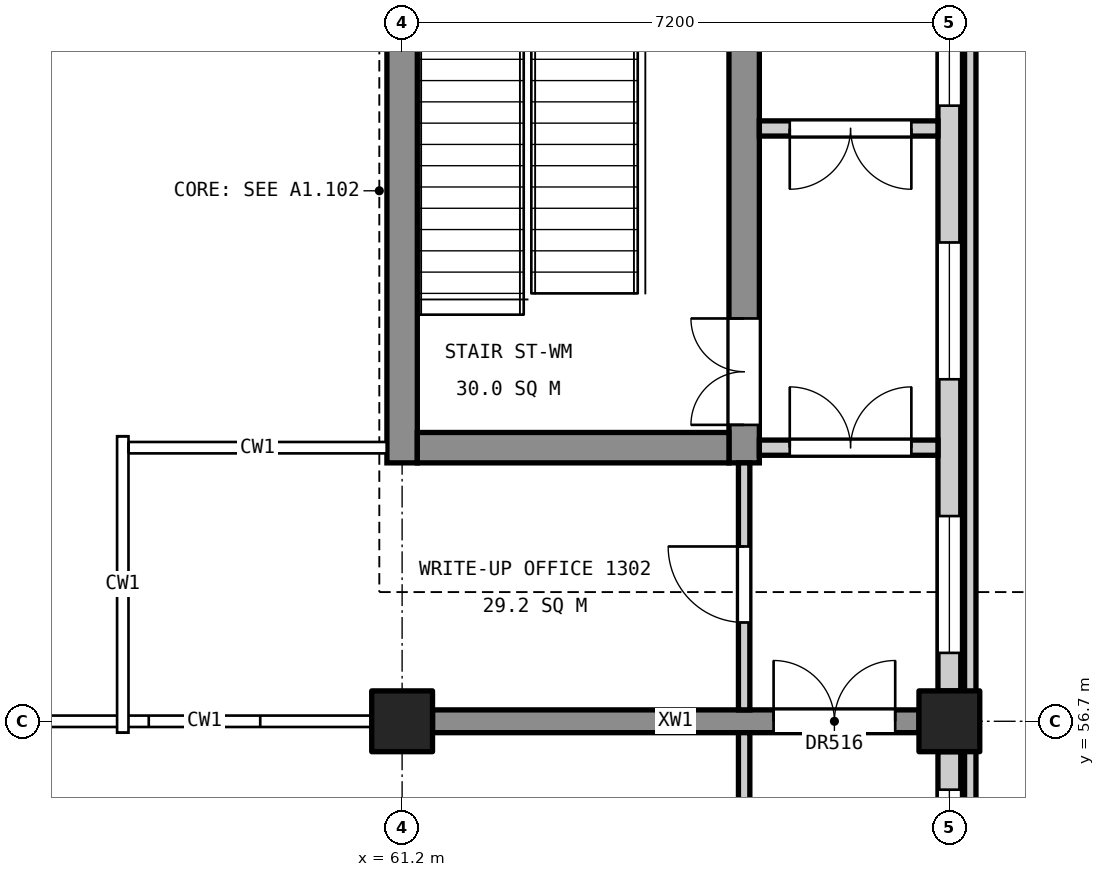
"""IFC4 building model, lengths in metres.
Left out: names, types, materials, properties, quantities, classifications, styles, units other than length and angle.
Written with IfcOpenShell. Run it as: python <this file> out.ifc"""

import sys

from ifc_helpers import new_model, si_unit, direction, frame, frame_2d, origin, origin_2d, place, context, subcontext, project, spatial, rectangle, extrude, element, fill, save


model = new_model("IFC4")
c1 = context("Model", 3, precision=1e-05, world=origin(), true_north=direction((0.0, 1.0)))
c2 = subcontext(c1, "Body", "Model", "MODEL_VIEW")
j1 = project(units=[si_unit("LENGTHUNIT", "METRE"), si_unit("PLANEANGLEUNIT", "RADIAN")], contexts=[c1])
p1 = place(None, origin())
s1 = spatial("IfcSite", under=j1, at=p1, CompositionType="ELEMENT")
p2 = place(p1, origin())
s2 = spatial("IfcBuilding", under=s1, at=p2, CompositionType="ELEMENT")
p3 = place(p2, frame((0.0, 0.0, 65.4)))
s3 = spatial("IfcBuildingStorey", under=s2, at=p3, CompositionType="ELEMENT", Elevation=65.4)
for number, where, z_axis, x_axis in (
    (1, (61.2, 56.7, 0.0), (0.0, 0.0, 1.0), (1.0, 0.0, 0.0)),
    (2, (68.4, 56.7, 0.0), (0.0, 0.0, 1.0), (1.0, 0.0, 0.0)),
):
    element("IfcColumn", number, at=place(p3, frame(where, z_axis=z_axis, x_axis=x_axis)), inside=s3, PredefinedType="COLUMN", context=c2, shape_type="SweptSolid", body=[
        extrude(rectangle(XDim=0.8, YDim=0.8, at=origin_2d()), origin(), (0.0, 0.0, 1.0), 4.8),
    ])
p4 = place(p3, frame((61.2, 60.1, 0.0), z_axis=(0.0, 0.0, 1.0), x_axis=(0.0, 1.0, 0.0)))
e3 = element("IfcWall", 3, at=p4, inside=s3, PredefinedType="SHEAR", context=c2, shape_type="SweptSolid", body=[
    extrude(rectangle(XDim=14.8, YDim=0.4, at=frame_2d((7.4, 0.0))), origin(), (0.0, 0.0, 1.0), 4.55),
])
p5 = place(p4, frame((6.11, 0.0, 3.4)))
e4 = element("IfcOpeningElement", 4, at=p5, cuts=e3, PredefinedType="OPENING", context=c2, shape_type="SweptSolid", body=[
    extrude(rectangle(XDim=1.2, YDim=0.9, at=frame_2d((0.6, 0.45))), frame((0.0, 0.21, 0.0), z_axis=(0.0, -1.0, 0.0), x_axis=(1.0, 0.0, 0.0)), (0.0, 0.0, 1.0), 0.42),
])
p6 = place(p3, frame((65.7, 60.1, 0.0), z_axis=(0.0, 0.0, 1.0), x_axis=(0.0, 1.0, 0.0)))
e5 = element("IfcWall", 5, at=p6, inside=s3, PredefinedType="SHEAR", context=c2, shape_type="SweptSolid", body=[
    extrude(rectangle(XDim=14.8, YDim=0.4, at=frame_2d((7.4, 0.0))), origin(), (0.0, 0.0, 1.0), 4.55),
])
p7 = place(p6, frame((0.5, 0.0, 0.0)))
e6 = element("IfcOpeningElement", 6, at=p7, cuts=e5, PredefinedType="OPENING", context=c2, shape_type="SweptSolid", body=[
    extrude(rectangle(XDim=1.4, YDim=2.1, at=frame_2d((0.7, 1.05))), frame((0.0, 0.21, 0.0), z_axis=(0.0, -1.0, 0.0), x_axis=(1.0, 0.0, 0.0)), (0.0, 0.0, 1.0), 0.42),
])
p8 = place(p6, frame((8.8, 0.0, 0.0)))
e7 = element("IfcOpeningElement", 7, at=p8, cuts=e5, PredefinedType="OPENING", context=c2, shape_type="SweptSolid", body=[
    extrude(rectangle(XDim=1.1, YDim=2.1, at=frame_2d((0.55, 1.05))), frame((0.0, 0.21, 0.0), z_axis=(0.0, -1.0, 0.0), x_axis=(1.0, 0.0, 0.0)), (0.0, 0.0, 1.0), 0.42),
])
p9 = place(p6, frame((11.35, 0.0, 0.0)))
e8 = element("IfcOpeningElement", 8, at=p9, cuts=e5, PredefinedType="OPENING", context=c2, shape_type="SweptSolid", body=[
    extrude(rectangle(XDim=1.1, YDim=2.1, at=frame_2d((0.55, 1.05))), frame((0.0, 0.21, 0.0), z_axis=(0.0, -1.0, 0.0), x_axis=(1.0, 0.0, 0.0)), (0.0, 0.0, 1.0), 0.42),
])
p10 = place(p3, frame((61.4, 60.3, 0.0), z_axis=(0.0, 0.0, 1.0), x_axis=(1.0, 0.0, 0.0)))
e9 = element("IfcWall", 9, at=p10, inside=s3, PredefinedType="SHEAR", context=c2, shape_type="SweptSolid", body=[
    extrude(rectangle(XDim=4.1, YDim=0.4, at=frame_2d((2.05, 0.0))), origin(), (0.0, 0.0, 1.0), 4.55),
])
p11 = place(p3, frame((61.6, 56.7, 0.0), z_axis=(0.0, 0.0, 1.0), x_axis=(1.0, 0.0, 0.0)))
e10 = element("IfcWall", 10, at=p11, inside=s3, PredefinedType="SHEAR", context=c2, shape_type="SweptSolid", body=[
    extrude(rectangle(XDim=6.4, YDim=0.3, at=frame_2d((3.2, 0.0))), origin(), (0.0, 0.0, 1.0), 4.55),
])
p12 = place(p11, frame((4.488, 0.0, 0.0)))
e11 = element("IfcOpeningElement", 11, at=p12, cuts=e10, PredefinedType="OPENING", context=c2, shape_type="SweptSolid", body=[
    extrude(rectangle(XDim=1.6, YDim=2.1, at=frame_2d((0.8, 1.05))), frame((0.0, 0.16, 0.0), z_axis=(0.0, -1.0, 0.0), x_axis=(1.0, 0.0, 0.0)), (0.0, 0.0, 1.0), 0.32),
])
p13 = place(p3, frame((68.675, 35.05, 0.0), z_axis=(0.0, 0.0, 1.0), x_axis=(0.0, 1.0, 0.0)))
e12 = element("IfcWall", 12, at=p13, inside=s3, PredefinedType="PARAPET", context=c2, shape_type="SweptSolid", body=[
    extrude(rectangle(XDim=64.9, YDim=0.15, at=frame_2d((32.45, 0.0))), origin(), (0.0, 0.0, 1.0), 0.3),
])
p14 = place(p3, frame((68.4, 46.3, 0.0), z_axis=(0.0, 0.0, 1.0), x_axis=(0.0, 1.0, 0.0)))
e13 = element("IfcWall", 13, at=p14, inside=s3, PredefinedType="STANDARD", context=c2, shape_type="SweptSolid", body=[
    extrude(rectangle(XDim=10.0, YDim=0.3, at=frame_2d((5.0, 0.0))), origin(), (0.0, 0.0, 1.0), 3.55),
])
p15 = place(p14, frame((0.5, 0.0, 0.9)))
e14 = element("IfcOpeningElement", 14, at=p15, cuts=e13, PredefinedType="OPENING", context=c2, shape_type="SweptSolid", body=[
    extrude(rectangle(XDim=1.8, YDim=2.4, at=frame_2d((0.9, 1.2))), frame((0.0, 0.16, 0.0), z_axis=(0.0, -1.0, 0.0), x_axis=(1.0, 0.0, 0.0)), (0.0, 0.0, 1.0), 0.32),
])
p16 = place(p14, frame((7.7, 0.0, 0.9)))
e15 = element("IfcOpeningElement", 15, at=p16, cuts=e13, PredefinedType="OPENING", context=c2, shape_type="SweptSolid", body=[
    extrude(rectangle(XDim=1.8, YDim=2.4, at=frame_2d((0.9, 1.2))), frame((0.0, 0.16, 0.0), z_axis=(0.0, -1.0, 0.0), x_axis=(1.0, 0.0, 0.0)), (0.0, 0.0, 1.0), 0.32),
])
p17 = place(p3, frame((68.4, 57.1, 0.0), z_axis=(0.0, 0.0, 1.0), x_axis=(0.0, 1.0, 0.0)))
e16 = element("IfcWall", 16, at=p17, inside=s3, PredefinedType="STANDARD", context=c2, shape_type="SweptSolid", body=[
    extrude(rectangle(XDim=10.0, YDim=0.3, at=frame_2d((5.0, 0.0))), origin(), (0.0, 0.0, 1.0), 3.55),
])
p18 = place(p17, frame((0.5, 0.0, 0.9)))
e17 = element("IfcOpeningElement", 17, at=p18, cuts=e16, PredefinedType="OPENING", context=c2, shape_type="SweptSolid", body=[
    extrude(rectangle(XDim=1.8, YDim=2.4, at=frame_2d((0.9, 1.2))), frame((0.0, 0.16, 0.0), z_axis=(0.0, -1.0, 0.0), x_axis=(1.0, 0.0, 0.0)), (0.0, 0.0, 1.0), 0.32),
])
p19 = place(p17, frame((4.1, 0.0, 0.9)))
e18 = element("IfcOpeningElement", 18, at=p19, cuts=e16, PredefinedType="OPENING", context=c2, shape_type="SweptSolid", body=[
    extrude(rectangle(XDim=1.8, YDim=2.4, at=frame_2d((0.9, 1.2))), frame((0.0, 0.16, 0.0), z_axis=(0.0, -1.0, 0.0), x_axis=(1.0, 0.0, 0.0)), (0.0, 0.0, 1.0), 0.32),
])
p20 = place(p17, frame((7.7, 0.0, 0.9)))
e19 = element("IfcOpeningElement", 19, at=p20, cuts=e16, PredefinedType="OPENING", context=c2, shape_type="SweptSolid", body=[
    extrude(rectangle(XDim=1.8, YDim=2.4, at=frame_2d((0.9, 1.2))), frame((0.0, 0.16, 0.0), z_axis=(0.0, -1.0, 0.0), x_axis=(1.0, 0.0, 0.0)), (0.0, 0.0, 1.0), 0.32),
])
p21 = place(p3, frame((65.7, 46.1, 0.0), z_axis=(0.0, 0.0, 1.0), x_axis=(0.0, 1.0, 0.0)))
e20 = element("IfcWall", 20, at=p21, inside=s3, PredefinedType="PARTITIONING", context=c2, shape_type="SweptSolid", body=[
    extrude(rectangle(XDim=10.45, YDim=0.15, at=frame_2d((5.225, 0.0))), origin(), (0.0, 0.0, 1.0), 3.55),
])
p22 = place(p21, frame((4.7, 0.0, 0.0)))
e21 = element("IfcOpeningElement", 21, at=p22, cuts=e20, PredefinedType="OPENING", context=c2, shape_type="SweptSolid", body=[
    extrude(rectangle(XDim=1.0, YDim=2.1, at=frame_2d((0.5, 1.05))), frame((0.0, 0.085, 0.0), z_axis=(0.0, -1.0, 0.0), x_axis=(1.0, 0.0, 0.0)), (0.0, 0.0, 1.0), 0.17),
])
p23 = place(p3, frame((65.7, 56.85, 0.0), z_axis=(0.0, 0.0, 1.0), x_axis=(0.0, 1.0, 0.0)))
e22 = element("IfcWall", 22, at=p23, inside=s3, PredefinedType="PARTITIONING", context=c2, shape_type="SweptSolid", body=[
    extrude(rectangle(XDim=3.25, YDim=0.15, at=frame_2d((1.625, 0.0))), origin(), (0.0, 0.0, 1.0), 3.55),
])
p24 = place(p23, frame((1.15, 0.0, 0.0)))
e23 = element("IfcOpeningElement", 23, at=p24, cuts=e22, PredefinedType="OPENING", context=c2, shape_type="SweptSolid", body=[
    extrude(rectangle(XDim=1.0, YDim=2.1, at=frame_2d((0.5, 1.05))), frame((0.0, 0.085, 0.0), z_axis=(0.0, -1.0, 0.0), x_axis=(1.0, 0.0, 0.0)), (0.0, 0.0, 1.0), 0.17),
])
p25 = place(p3, frame((65.9, 60.3, 0.0), z_axis=(0.0, 0.0, 1.0), x_axis=(1.0, 0.0, 0.0)))
e24 = element("IfcWall", 24, at=p25, inside=s3, PredefinedType="PARTITIONING", context=c2, shape_type="SweptSolid", body=[
    extrude(rectangle(XDim=2.35, YDim=0.2, at=frame_2d((1.175, 0.0))), origin(), (0.0, 0.0, 1.0), 3.85),
])
p26 = place(p25, frame((0.4, 0.0, 0.0)))
e25 = element("IfcOpeningElement", 25, at=p26, cuts=e24, PredefinedType="OPENING", context=c2, shape_type="SweptSolid", body=[
    extrude(rectangle(XDim=1.6, YDim=2.1, at=frame_2d((0.8, 1.05))), frame((0.0, 0.11, 0.0), z_axis=(0.0, -1.0, 0.0), x_axis=(1.0, 0.0, 0.0)), (0.0, 0.0, 1.0), 0.22),
])
p27 = place(p3, frame((65.9, 64.5, 0.0), z_axis=(0.0, 0.0, 1.0), x_axis=(1.0, 0.0, 0.0)))
e26 = element("IfcWall", 26, at=p27, inside=s3, PredefinedType="PARTITIONING", context=c2, shape_type="SweptSolid", body=[
    extrude(rectangle(XDim=2.35, YDim=0.2, at=frame_2d((1.175, 0.0))), origin(), (0.0, 0.0, 1.0), 3.55),
])
p28 = place(p27, frame((0.4, 0.0, 0.0)))
e27 = element("IfcOpeningElement", 27, at=p28, cuts=e26, PredefinedType="OPENING", context=c2, shape_type="SweptSolid", body=[
    extrude(rectangle(XDim=1.6, YDim=2.1, at=frame_2d((0.8, 1.05))), frame((0.0, 0.11, 0.0), z_axis=(0.0, -1.0, 0.0), x_axis=(1.0, 0.0, 0.0)), (0.0, 0.0, 1.0), 0.22),
])
p29 = place(p7, origin())
e28 = element("IfcDoor", 28, at=p29, inside=s3, OperationType="DOUBLE_DOOR_SINGLE_SWING", PredefinedType="DOOR", context=c2, shape_type="SweptSolid", body=[
    extrude(rectangle(XDim=1.4, YDim=2.1, at=frame_2d((0.7, 1.05))), frame((0.0, 0.025, 0.0), z_axis=(0.0, -1.0, 0.0), x_axis=(1.0, 0.0, 0.0)), (0.0, 0.0, 1.0), 0.05),
])
fill(e6, e28)
p30 = place(p16, origin())
e29 = element("IfcWindow", 29, at=p30, inside=s3, PartitioningType="SINGLE_PANEL", PredefinedType="WINDOW", context=c2, shape_type="SweptSolid", body=[
    extrude(rectangle(XDim=1.8, YDim=2.4, at=frame_2d((0.9, 1.2))), frame((0.0, 0.03, 0.0), z_axis=(0.0, -1.0, 0.0), x_axis=(1.0, 0.0, 0.0)), (0.0, 0.0, 1.0), 0.06),
])
fill(e15, e29)
p31 = place(p18, origin())
e30 = element("IfcWindow", 30, at=p31, inside=s3, PartitioningType="SINGLE_PANEL", PredefinedType="WINDOW", context=c2, shape_type="SweptSolid", body=[
    extrude(rectangle(XDim=1.8, YDim=2.4, at=frame_2d((0.9, 1.2))), frame((0.0, 0.03, 0.0), z_axis=(0.0, -1.0, 0.0), x_axis=(1.0, 0.0, 0.0)), (0.0, 0.0, 1.0), 0.06),
])
fill(e17, e30)
p32 = place(p19, origin())
e31 = element("IfcWindow", 31, at=p32, inside=s3, PartitioningType="SINGLE_PANEL", PredefinedType="WINDOW", context=c2, shape_type="SweptSolid", body=[
    extrude(rectangle(XDim=1.8, YDim=2.4, at=frame_2d((0.9, 1.2))), frame((0.0, 0.03, 0.0), z_axis=(0.0, -1.0, 0.0), x_axis=(1.0, 0.0, 0.0)), (0.0, 0.0, 1.0), 0.06),
])
fill(e18, e31)
p33 = place(p20, origin())
e32 = element("IfcWindow", 32, at=p33, inside=s3, PartitioningType="SINGLE_PANEL", PredefinedType="WINDOW", context=c2, shape_type="SweptSolid", body=[
    extrude(rectangle(XDim=1.8, YDim=2.4, at=frame_2d((0.9, 1.2))), frame((0.0, 0.03, 0.0), z_axis=(0.0, -1.0, 0.0), x_axis=(1.0, 0.0, 0.0)), (0.0, 0.0, 1.0), 0.06),
])
fill(e19, e32)
p34 = place(p24, origin())
e33 = element("IfcDoor", 33, at=p34, inside=s3, OperationType="SINGLE_SWING_RIGHT", PredefinedType="DOOR", context=c2, shape_type="SweptSolid", body=[
    extrude(rectangle(XDim=1.0, YDim=2.1, at=frame_2d((0.5, 1.05))), frame((0.0, 0.025, 0.0), z_axis=(0.0, -1.0, 0.0), x_axis=(1.0, 0.0, 0.0)), (0.0, 0.0, 1.0), 0.05),
])
fill(e23, e33)
p35 = place(p26, origin())
e34 = element("IfcDoor", 34, at=p35, inside=s3, OperationType="DOUBLE_DOOR_SINGLE_SWING", PredefinedType="DOOR", context=c2, shape_type="SweptSolid", body=[
    extrude(rectangle(XDim=1.6, YDim=2.1, at=frame_2d((0.8, 1.05))), frame((0.0, 0.025, 0.0), z_axis=(0.0, -1.0, 0.0), x_axis=(1.0, 0.0, 0.0)), (0.0, 0.0, 1.0), 0.05),
])
fill(e25, e34)
p36 = place(p28, frame((1.6, 0.0, 0.0), z_axis=(0.0, 0.0, 1.0), x_axis=(-1.0, 0.0, 0.0)))
e35 = element("IfcDoor", 35, at=p36, inside=s3, OperationType="DOUBLE_DOOR_SINGLE_SWING", PredefinedType="DOOR", context=c2, shape_type="SweptSolid", body=[
    extrude(rectangle(XDim=1.6, YDim=2.1, at=frame_2d((0.8, 1.05))), frame((0.0, 0.025, 0.0), z_axis=(0.0, -1.0, 0.0), x_axis=(1.0, 0.0, 0.0)), (0.0, 0.0, 1.0), 0.05),
])
fill(e27, e35)
p37 = place(p12, origin())
e36 = element("IfcDoor", 36, at=p37, inside=s3, OperationType="DOUBLE_DOOR_SINGLE_SWING", PredefinedType="DOOR", context=c2, shape_type="SweptSolid", body=[
    extrude(rectangle(XDim=1.6, YDim=2.1, at=frame_2d((0.8, 1.05))), frame((0.0, 0.025, 0.0), z_axis=(0.0, -1.0, 0.0), x_axis=(1.0, 0.0, 0.0)), (0.0, 0.0, 1.0), 0.05),
])
fill(e11, e36)
save(model, sys.argv[1])
